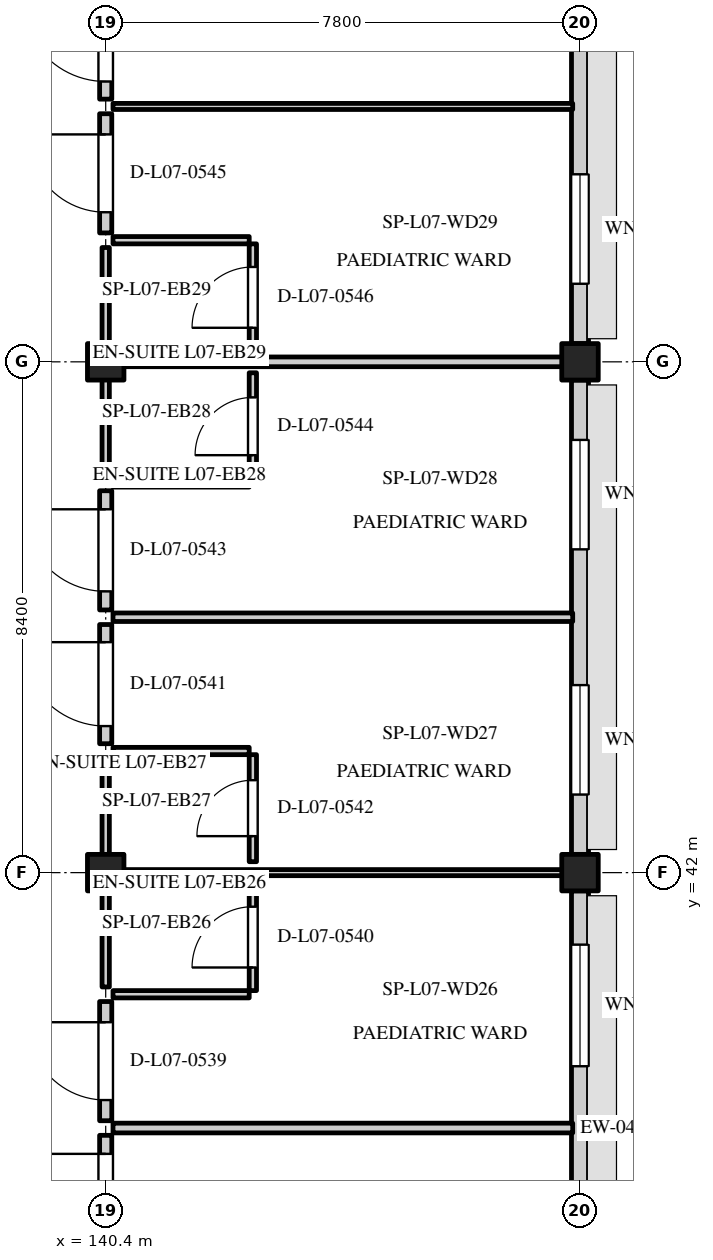
"""IFC4 building model, lengths in metres.
Left out: names, types, materials, properties, quantities, classifications, styles, units other than length and angle.
Written with IfcOpenShell. Run it as: python <this file> out.ifc"""

import sys

from ifc_helpers import new_model, si_unit, direction, frame, frame_2d, origin, origin_2d, place, context, subcontext, project, spatial, rectangle, extrude, element, fill, save


model = new_model("IFC4")
c1 = context("Model", 3, precision=1e-05, world=origin(), true_north=direction((0.0, 1.0)))
c2 = subcontext(c1, "Body", "Model", "MODEL_VIEW")
j1 = project(units=[si_unit("LENGTHUNIT", "METRE"), si_unit("PLANEANGLEUNIT", "RADIAN")], contexts=[c1])
p1 = place(None, origin())
s1 = spatial("IfcSite", under=j1, at=p1, CompositionType="ELEMENT")
p2 = place(p1, origin())
s2 = spatial("IfcBuilding", under=s1, at=p2, CompositionType="ELEMENT")
p3 = place(p2, frame((0.0, 0.0, 29.7)))
s3 = spatial("IfcBuildingStorey", under=s2, at=p3, CompositionType="ELEMENT", Elevation=29.7)
for number, where, z_axis, x_axis in (
    (1, (140.4, 42.0, 0.0), (0.0, 0.0, 1.0), (1.0, 0.0, 0.0)),
    (2, (140.4, 50.4, 0.0), (0.0, 0.0, 1.0), (1.0, 0.0, 0.0)),
    (3, (148.2, 42.0, 0.0), (0.0, 0.0, 1.0), (1.0, 0.0, 0.0)),
    (4, (148.2, 50.4, 0.0), (0.0, 0.0, 1.0), (1.0, 0.0, 0.0)),
):
    element("IfcColumn", number, at=place(p3, frame(where, z_axis=z_axis, x_axis=x_axis)), inside=s3, PredefinedType="COLUMN", context=c2, shape_type="SweptSolid", body=[
        extrude(rectangle(XDim=0.6, YDim=0.6, at=origin_2d()), origin(), (0.0, 0.0, 1.0), 4.2),
    ])
p4 = place(p3, frame((148.2, 33.9, 0.0), z_axis=(0.0, 0.0, 1.0), x_axis=(0.0, 1.0, 0.0)))
e5 = element("IfcWall", 5, at=p4, inside=s3, PredefinedType="STANDARD", context=c2, shape_type="SweptSolid", body=[
    extrude(rectangle(XDim=7.8, YDim=0.28, at=frame_2d((3.9, 0.0))), origin(), (0.0, 0.0, 1.0), 3.25),
])
p5 = place(p4, frame((0.884, 0.0, 0.8)))
e6 = element("IfcOpeningElement", 6, at=p5, cuts=e5, PredefinedType="OPENING", context=c2, shape_type="SweptSolid", body=[
    extrude(rectangle(XDim=2.0, YDim=1.45, at=frame_2d((1.0, 0.725))), frame((0.0, 0.152, 0.0), z_axis=(0.0, -1.0, 0.0), x_axis=(1.0, 0.0, 0.0)), (0.0, 0.0, 1.0), 0.304),
])
p6 = place(p4, frame((4.916, 0.0, 0.8)))
e7 = element("IfcOpeningElement", 7, at=p6, cuts=e5, PredefinedType="OPENING", context=c2, shape_type="SweptSolid", body=[
    extrude(rectangle(XDim=2.0, YDim=1.45, at=frame_2d((1.0, 0.725))), frame((0.0, 0.152, 0.0), z_axis=(0.0, -1.0, 0.0), x_axis=(1.0, 0.0, 0.0)), (0.0, 0.0, 1.0), 0.304),
])
p7 = place(p3, frame((148.2, 42.3, 0.0), z_axis=(0.0, 0.0, 1.0), x_axis=(0.0, 1.0, 0.0)))
e8 = element("IfcWall", 8, at=p7, inside=s3, PredefinedType="STANDARD", context=c2, shape_type="SweptSolid", body=[
    extrude(rectangle(XDim=7.8, YDim=0.28, at=frame_2d((3.9, 0.0))), origin(), (0.0, 0.0, 1.0), 3.25),
])
p8 = place(p7, frame((0.984, 0.0, 0.8)))
e9 = element("IfcOpeningElement", 9, at=p8, cuts=e8, PredefinedType="OPENING", context=c2, shape_type="SweptSolid", body=[
    extrude(rectangle(XDim=1.8, YDim=1.75, at=frame_2d((0.9, 0.875))), frame((0.0, 0.152, 0.0), z_axis=(0.0, -1.0, 0.0), x_axis=(1.0, 0.0, 0.0)), (0.0, 0.0, 1.0), 0.304),
])
p9 = place(p7, frame((5.016, 0.0, 0.8)))
e10 = element("IfcOpeningElement", 10, at=p9, cuts=e8, PredefinedType="OPENING", context=c2, shape_type="SweptSolid", body=[
    extrude(rectangle(XDim=1.8, YDim=1.75, at=frame_2d((0.9, 0.875))), frame((0.0, 0.152, 0.0), z_axis=(0.0, -1.0, 0.0), x_axis=(1.0, 0.0, 0.0)), (0.0, 0.0, 1.0), 0.304),
])
p10 = place(p3, frame((148.2, 50.7, 0.0), z_axis=(0.0, 0.0, 1.0), x_axis=(0.0, 1.0, 0.0)))
e11 = element("IfcWall", 11, at=p10, inside=s3, PredefinedType="STANDARD", context=c2, shape_type="SweptSolid", body=[
    extrude(rectangle(XDim=7.8, YDim=0.28, at=frame_2d((3.9, 0.0))), origin(), (0.0, 0.0, 1.0), 3.25),
])
p11 = place(p10, frame((0.984, 0.0, 0.8)))
e12 = element("IfcOpeningElement", 12, at=p11, cuts=e11, PredefinedType="OPENING", context=c2, shape_type="SweptSolid", body=[
    extrude(rectangle(XDim=1.8, YDim=1.65, at=frame_2d((0.9, 0.825))), frame((0.0, 0.152, 0.0), z_axis=(0.0, -1.0, 0.0), x_axis=(1.0, 0.0, 0.0)), (0.0, 0.0, 1.0), 0.304),
])
p12 = place(p10, frame((5.016, 0.0, 0.8)))
e13 = element("IfcOpeningElement", 13, at=p12, cuts=e11, PredefinedType="OPENING", context=c2, shape_type="SweptSolid", body=[
    extrude(rectangle(XDim=1.8, YDim=1.65, at=frame_2d((0.9, 0.825))), frame((0.0, 0.152, 0.0), z_axis=(0.0, -1.0, 0.0), x_axis=(1.0, 0.0, 0.0)), (0.0, 0.0, 1.0), 0.304),
])
p13 = place(p3, frame((140.52, 37.8, 0.0), z_axis=(0.0, 0.0, 1.0), x_axis=(1.0, 0.0, 0.0)))
e14 = element("IfcWall", 14, at=p13, inside=s3, PredefinedType="PARTITIONING", context=c2, shape_type="SweptSolid", body=[
    extrude(rectangle(XDim=7.56, YDim=0.16, at=frame_2d((3.78, 0.0))), origin(), (0.0, 0.0, 1.0), 3.88),
])
p14 = place(p3, frame((140.4, 35.72, 0.0), z_axis=(0.0, 0.0, 1.0), x_axis=(0.0, 1.0, 0.0)))
e15 = element("IfcWall", 15, at=p14, inside=s3, PredefinedType="STANDARD", context=c2, shape_type="SweptSolid", body=[
    extrude(rectangle(XDim=1.96, YDim=0.2, at=frame_2d((0.98, 0.0))), origin(), (0.0, 0.0, 1.0), 3.88),
])
p15 = place(p14, frame((0.305, 0.0, 0.0)))
e16 = element("IfcOpeningElement", 16, at=p15, cuts=e15, PredefinedType="OPENING", context=c2, shape_type="SweptSolid", body=[
    extrude(rectangle(XDim=1.35, YDim=2.15, at=frame_2d((0.675, 1.075))), frame((0.0, 0.112, 0.0), z_axis=(0.0, -1.0, 0.0), x_axis=(1.0, 0.0, 0.0)), (0.0, 0.0, 1.0), 0.224),
])
p16 = place(p3, frame((140.52, 42.0, 0.0), z_axis=(0.0, 0.0, 1.0), x_axis=(1.0, 0.0, 0.0)))
e17 = element("IfcWall", 17, at=p16, inside=s3, PredefinedType="PARTITIONING", context=c2, shape_type="SweptSolid", body=[
    extrude(rectangle(XDim=7.56, YDim=0.1, at=frame_2d((3.78, 0.0))), origin(), (0.0, 0.0, 1.0), 3.88),
])
p17 = place(p3, frame((140.4, 37.92, 0.0), z_axis=(0.0, 0.0, 1.0), x_axis=(0.0, 1.0, 0.0)))
e18 = element("IfcWall", 18, at=p17, inside=s3, PredefinedType="STANDARD", context=c2, shape_type="SweptSolid", body=[
    extrude(rectangle(XDim=1.96, YDim=0.2, at=frame_2d((0.98, 0.0))), origin(), (0.0, 0.0, 1.0), 3.88),
])
p18 = place(p17, frame((0.34, 0.0, 0.0)))
e19 = element("IfcOpeningElement", 19, at=p18, cuts=e18, PredefinedType="OPENING", context=c2, shape_type="SweptSolid", body=[
    extrude(rectangle(XDim=1.28, YDim=2.15, at=frame_2d((0.64, 1.075))), frame((0.0, 0.112, 0.0), z_axis=(0.0, -1.0, 0.0), x_axis=(1.0, 0.0, 0.0)), (0.0, 0.0, 1.0), 0.224),
])
p19 = place(p3, frame((140.4, 40.12, 0.0), z_axis=(0.0, 0.0, 1.0), x_axis=(0.0, 1.0, 0.0)))
e20 = element("IfcWall", 20, at=p19, inside=s3, PredefinedType="PARTITIONING", context=c2, shape_type="SweptSolid", body=[
    extrude(rectangle(XDim=1.76, YDim=0.12, at=frame_2d((0.88, 0.0))), origin(), (0.0, 0.0, 1.0), 3.88),
])
p20 = place(p3, frame((140.52, 40.0, 0.0), z_axis=(0.0, 0.0, 1.0), x_axis=(1.0, 0.0, 0.0)))
e21 = element("IfcWall", 21, at=p20, inside=s3, PredefinedType="PARTITIONING", context=c2, shape_type="SweptSolid", body=[
    extrude(rectangle(XDim=2.24, YDim=0.12, at=frame_2d((1.12, 0.0))), origin(), (0.0, 0.0, 1.0), 3.88),
])
p21 = place(p3, frame((142.82, 40.06, 0.0), z_axis=(0.0, 0.0, 1.0), x_axis=(0.0, 1.0, 0.0)))
e22 = element("IfcWall", 22, at=p21, inside=s3, PredefinedType="PARTITIONING", context=c2, shape_type="SweptSolid", body=[
    extrude(rectangle(XDim=1.76, YDim=0.12, at=frame_2d((0.88, 0.0))), origin(), (0.0, 0.0, 1.0), 3.88),
])
p22 = place(p21, frame((0.38, 0.0, 0.0)))
e23 = element("IfcOpeningElement", 23, at=p22, cuts=e22, PredefinedType="OPENING", context=c2, shape_type="SweptSolid", body=[
    extrude(rectangle(XDim=1.0, YDim=2.1, at=frame_2d((0.5, 1.05))), frame((0.0, 0.072, 0.0), z_axis=(0.0, -1.0, 0.0), x_axis=(1.0, 0.0, 0.0)), (0.0, 0.0, 1.0), 0.144),
])
p23 = place(p3, frame((140.52, 46.2, 0.0), z_axis=(0.0, 0.0, 1.0), x_axis=(1.0, 0.0, 0.0)))
e24 = element("IfcWall", 24, at=p23, inside=s3, PredefinedType="PARTITIONING", context=c2, shape_type="SweptSolid", body=[
    extrude(rectangle(XDim=7.56, YDim=0.14, at=frame_2d((3.78, 0.0))), origin(), (0.0, 0.0, 1.0), 3.88),
])
p24 = place(p3, frame((140.4, 44.12, 0.0), z_axis=(0.0, 0.0, 1.0), x_axis=(0.0, 1.0, 0.0)))
e25 = element("IfcWall", 25, at=p24, inside=s3, PredefinedType="STANDARD", context=c2, shape_type="SweptSolid", body=[
    extrude(rectangle(XDim=1.96, YDim=0.2, at=frame_2d((0.98, 0.0))), origin(), (0.0, 0.0, 1.0), 3.88),
])
p25 = place(p24, frame((0.29, 0.0, 0.0)))
e26 = element("IfcOpeningElement", 26, at=p25, cuts=e25, PredefinedType="OPENING", context=c2, shape_type="SweptSolid", body=[
    extrude(rectangle(XDim=1.38, YDim=2.2, at=frame_2d((0.69, 1.1))), frame((0.0, 0.112, 0.0), z_axis=(0.0, -1.0, 0.0), x_axis=(1.0, 0.0, 0.0)), (0.0, 0.0, 1.0), 0.224),
])
p26 = place(p3, frame((140.4, 42.12, 0.0), z_axis=(0.0, 0.0, 1.0), x_axis=(0.0, 1.0, 0.0)))
e27 = element("IfcWall", 27, at=p26, inside=s3, PredefinedType="PARTITIONING", context=c2, shape_type="SweptSolid", body=[
    extrude(rectangle(XDim=1.76, YDim=0.12, at=frame_2d((0.88, 0.0))), origin(), (0.0, 0.0, 1.0), 3.88),
])
p27 = place(p3, frame((140.52, 44.0, 0.0), z_axis=(0.0, 0.0, 1.0), x_axis=(1.0, 0.0, 0.0)))
e28 = element("IfcWall", 28, at=p27, inside=s3, PredefinedType="PARTITIONING", context=c2, shape_type="SweptSolid", body=[
    extrude(rectangle(XDim=2.24, YDim=0.12, at=frame_2d((1.12, 0.0))), origin(), (0.0, 0.0, 1.0), 3.88),
])
p28 = place(p3, frame((142.82, 42.18, 0.0), z_axis=(0.0, 0.0, 1.0), x_axis=(0.0, 1.0, 0.0)))
e29 = element("IfcWall", 29, at=p28, inside=s3, PredefinedType="PARTITIONING", context=c2, shape_type="SweptSolid", body=[
    extrude(rectangle(XDim=1.76, YDim=0.12, at=frame_2d((0.88, 0.0))), origin(), (0.0, 0.0, 1.0), 3.88),
])
p29 = place(p28, frame((0.42, 0.0, 0.0)))
e30 = element("IfcOpeningElement", 30, at=p29, cuts=e29, PredefinedType="OPENING", context=c2, shape_type="SweptSolid", body=[
    extrude(rectangle(XDim=0.92, YDim=2.08, at=frame_2d((0.46, 1.04))), frame((0.0, 0.072, 0.0), z_axis=(0.0, -1.0, 0.0), x_axis=(1.0, 0.0, 0.0)), (0.0, 0.0, 1.0), 0.144),
])
p30 = place(p3, frame((140.52, 50.4, 0.0), z_axis=(0.0, 0.0, 1.0), x_axis=(1.0, 0.0, 0.0)))
e31 = element("IfcWall", 31, at=p30, inside=s3, PredefinedType="PARTITIONING", context=c2, shape_type="SweptSolid", body=[
    extrude(rectangle(XDim=7.56, YDim=0.16, at=frame_2d((3.78, 0.0))), origin(), (0.0, 0.0, 1.0), 3.25),
])
p31 = place(p3, frame((140.4, 46.32, 0.0), z_axis=(0.0, 0.0, 1.0), x_axis=(0.0, 1.0, 0.0)))
e32 = element("IfcWall", 32, at=p31, inside=s3, PredefinedType="STANDARD", context=c2, shape_type="SweptSolid", body=[
    extrude(rectangle(XDim=1.96, YDim=0.2, at=frame_2d((0.98, 0.0))), origin(), (0.0, 0.0, 1.0), 3.88),
])
p32 = place(p31, frame((0.305, 0.0, 0.0)))
e33 = element("IfcOpeningElement", 33, at=p32, cuts=e32, PredefinedType="OPENING", context=c2, shape_type="SweptSolid", body=[
    extrude(rectangle(XDim=1.35, YDim=2.15, at=frame_2d((0.675, 1.075))), frame((0.0, 0.112, 0.0), z_axis=(0.0, -1.0, 0.0), x_axis=(1.0, 0.0, 0.0)), (0.0, 0.0, 1.0), 0.224),
])
p33 = place(p3, frame((140.4, 48.52, 0.0), z_axis=(0.0, 0.0, 1.0), x_axis=(0.0, 1.0, 0.0)))
e34 = element("IfcWall", 34, at=p33, inside=s3, PredefinedType="PARTITIONING", context=c2, shape_type="SweptSolid", body=[
    extrude(rectangle(XDim=1.76, YDim=0.12, at=frame_2d((0.88, 0.0))), origin(), (0.0, 0.0, 1.0), 3.88),
])
p34 = place(p3, frame((140.52, 48.4, 0.0), z_axis=(0.0, 0.0, 1.0), x_axis=(1.0, 0.0, 0.0)))
e35 = element("IfcWall", 35, at=p34, inside=s3, PredefinedType="PARTITIONING", context=c2, shape_type="SweptSolid", body=[
    extrude(rectangle(XDim=2.24, YDim=0.12, at=frame_2d((1.12, 0.0))), origin(), (0.0, 0.0, 1.0), 3.88),
])
p35 = place(p3, frame((142.82, 48.46, 0.0), z_axis=(0.0, 0.0, 1.0), x_axis=(0.0, 1.0, 0.0)))
e36 = element("IfcWall", 36, at=p35, inside=s3, PredefinedType="PARTITIONING", context=c2, shape_type="SweptSolid", body=[
    extrude(rectangle(XDim=1.76, YDim=0.12, at=frame_2d((0.88, 0.0))), origin(), (0.0, 0.0, 1.0), 3.88),
])
p36 = place(p35, frame((0.405, 0.0, 0.0)))
e37 = element("IfcOpeningElement", 37, at=p36, cuts=e36, PredefinedType="OPENING", context=c2, shape_type="SweptSolid", body=[
    extrude(rectangle(XDim=0.95, YDim=2.1, at=frame_2d((0.475, 1.05))), frame((0.0, 0.072, 0.0), z_axis=(0.0, -1.0, 0.0), x_axis=(1.0, 0.0, 0.0)), (0.0, 0.0, 1.0), 0.144),
])
p37 = place(p3, frame((140.52, 54.6, 0.0), z_axis=(0.0, 0.0, 1.0), x_axis=(1.0, 0.0, 0.0)))
e38 = element("IfcWall", 38, at=p37, inside=s3, PredefinedType="PARTITIONING", context=c2, shape_type="SweptSolid", body=[
    extrude(rectangle(XDim=7.56, YDim=0.1, at=frame_2d((3.78, 0.0))), origin(), (0.0, 0.0, 1.0), 3.88),
])
p38 = place(p3, frame((140.4, 52.52, 0.0), z_axis=(0.0, 0.0, 1.0), x_axis=(0.0, 1.0, 0.0)))
e39 = element("IfcWall", 39, at=p38, inside=s3, PredefinedType="STANDARD", context=c2, shape_type="SweptSolid", body=[
    extrude(rectangle(XDim=1.96, YDim=0.2, at=frame_2d((0.98, 0.0))), origin(), (0.0, 0.0, 1.0), 3.88),
])
p39 = place(p38, frame((0.34, 0.0, 0.0)))
e40 = element("IfcOpeningElement", 40, at=p39, cuts=e39, PredefinedType="OPENING", context=c2, shape_type="SweptSolid", body=[
    extrude(rectangle(XDim=1.28, YDim=2.15, at=frame_2d((0.64, 1.075))), frame((0.0, 0.112, 0.0), z_axis=(0.0, -1.0, 0.0), x_axis=(1.0, 0.0, 0.0)), (0.0, 0.0, 1.0), 0.224),
])
p40 = place(p3, frame((140.4, 50.52, 0.0), z_axis=(0.0, 0.0, 1.0), x_axis=(0.0, 1.0, 0.0)))
e41 = element("IfcWall", 41, at=p40, inside=s3, PredefinedType="PARTITIONING", context=c2, shape_type="SweptSolid", body=[
    extrude(rectangle(XDim=1.76, YDim=0.12, at=frame_2d((0.88, 0.0))), origin(), (0.0, 0.0, 1.0), 3.88),
])
p41 = place(p3, frame((140.52, 52.4, 0.0), z_axis=(0.0, 0.0, 1.0), x_axis=(1.0, 0.0, 0.0)))
e42 = element("IfcWall", 42, at=p41, inside=s3, PredefinedType="PARTITIONING", context=c2, shape_type="SweptSolid", body=[
    extrude(rectangle(XDim=2.24, YDim=0.12, at=frame_2d((1.12, 0.0))), origin(), (0.0, 0.0, 1.0), 3.88),
])
p42 = place(p3, frame((142.82, 50.58, 0.0), z_axis=(0.0, 0.0, 1.0), x_axis=(0.0, 1.0, 0.0)))
e43 = element("IfcWall", 43, at=p42, inside=s3, PredefinedType="PARTITIONING", context=c2, shape_type="SweptSolid", body=[
    extrude(rectangle(XDim=1.76, YDim=0.12, at=frame_2d((0.88, 0.0))), origin(), (0.0, 0.0, 1.0), 3.88),
])
p43 = place(p42, frame((0.38, 0.0, 0.0)))
e44 = element("IfcOpeningElement", 44, at=p43, cuts=e43, PredefinedType="OPENING", context=c2, shape_type="SweptSolid", body=[
    extrude(rectangle(XDim=1.0, YDim=2.1, at=frame_2d((0.5, 1.05))), frame((0.0, 0.072, 0.0), z_axis=(0.0, -1.0, 0.0), x_axis=(1.0, 0.0, 0.0)), (0.0, 0.0, 1.0), 0.144),
])
p44 = place(p3, frame((140.4, 54.72, 0.0), z_axis=(0.0, 0.0, 1.0), x_axis=(0.0, 1.0, 0.0)))
e45 = element("IfcWall", 45, at=p44, inside=s3, PredefinedType="STANDARD", context=c2, shape_type="SweptSolid", body=[
    extrude(rectangle(XDim=1.96, YDim=0.2, at=frame_2d((0.98, 0.0))), origin(), (0.0, 0.0, 1.0), 3.88),
])
p45 = place(p44, frame((0.29, 0.0, 0.0)))
e46 = element("IfcOpeningElement", 46, at=p45, cuts=e45, PredefinedType="OPENING", context=c2, shape_type="SweptSolid", body=[
    extrude(rectangle(XDim=1.38, YDim=2.2, at=frame_2d((0.69, 1.1))), frame((0.0, 0.112, 0.0), z_axis=(0.0, -1.0, 0.0), x_axis=(1.0, 0.0, 0.0)), (0.0, 0.0, 1.0), 0.224),
])
p46 = place(p6, origin())
e47 = element("IfcWindow", 47, at=p46, inside=s3, PartitioningType="DOUBLE_PANEL_VERTICAL", PredefinedType="WINDOW", context=c2, shape_type="SweptSolid", body=[
    extrude(rectangle(XDim=2.0, YDim=1.45, at=frame_2d((1.0, 0.725))), frame((0.0, 0.03, 0.0), z_axis=(0.0, -1.0, 0.0), x_axis=(1.0, 0.0, 0.0)), (0.0, 0.0, 1.0), 0.06),
])
fill(e7, e47)
p47 = place(p8, origin())
e48 = element("IfcWindow", 48, at=p47, inside=s3, PartitioningType="DOUBLE_PANEL_VERTICAL", PredefinedType="WINDOW", context=c2, shape_type="SweptSolid", body=[
    extrude(rectangle(XDim=1.8, YDim=1.75, at=frame_2d((0.9, 0.875))), frame((0.0, 0.03, 0.0), z_axis=(0.0, -1.0, 0.0), x_axis=(1.0, 0.0, 0.0)), (0.0, 0.0, 1.0), 0.06),
])
fill(e9, e48)
p48 = place(p9, origin())
e49 = element("IfcWindow", 49, at=p48, inside=s3, PartitioningType="DOUBLE_PANEL_VERTICAL", PredefinedType="WINDOW", context=c2, shape_type="SweptSolid", body=[
    extrude(rectangle(XDim=1.8, YDim=1.75, at=frame_2d((0.9, 0.875))), frame((0.0, 0.03, 0.0), z_axis=(0.0, -1.0, 0.0), x_axis=(1.0, 0.0, 0.0)), (0.0, 0.0, 1.0), 0.06),
])
fill(e10, e49)
p49 = place(p11, origin())
e50 = element("IfcWindow", 50, at=p49, inside=s3, PartitioningType="DOUBLE_PANEL_VERTICAL", PredefinedType="WINDOW", context=c2, shape_type="SweptSolid", body=[
    extrude(rectangle(XDim=1.8, YDim=1.65, at=frame_2d((0.9, 0.825))), frame((0.0, 0.03, 0.0), z_axis=(0.0, -1.0, 0.0), x_axis=(1.0, 0.0, 0.0)), (0.0, 0.0, 1.0), 0.06),
])
fill(e12, e50)
p50 = place(p15, frame((1.35, 0.0, 0.0), z_axis=(0.0, 0.0, 1.0), x_axis=(-1.0, 0.0, 0.0)))
e51 = element("IfcDoor", 51, at=p50, inside=s3, OperationType="SINGLE_SWING_LEFT", PredefinedType="DOOR", context=c2, shape_type="SweptSolid", body=[
    extrude(rectangle(XDim=1.35, YDim=2.15, at=frame_2d((0.675, 1.075))), frame((0.0, 0.025, 0.0), z_axis=(0.0, -1.0, 0.0), x_axis=(1.0, 0.0, 0.0)), (0.0, 0.0, 1.0), 0.05),
])
fill(e16, e51)
p51 = place(p18, frame((1.28, 0.0, 0.0), z_axis=(0.0, 0.0, 1.0), x_axis=(-1.0, 0.0, 0.0)))
e52 = element("IfcDoor", 52, at=p51, inside=s3, OperationType="SINGLE_SWING_LEFT", PredefinedType="DOOR", context=c2, shape_type="SweptSolid", body=[
    extrude(rectangle(XDim=1.28, YDim=2.15, at=frame_2d((0.64, 1.075))), frame((0.0, 0.025, 0.0), z_axis=(0.0, -1.0, 0.0), x_axis=(1.0, 0.0, 0.0)), (0.0, 0.0, 1.0), 0.05),
])
fill(e19, e52)
p52 = place(p22, origin())
e53 = element("IfcDoor", 53, at=p52, inside=s3, OperationType="SINGLE_SWING_LEFT", PredefinedType="DOOR", context=c2, shape_type="SweptSolid", body=[
    extrude(rectangle(XDim=1.0, YDim=2.1, at=frame_2d((0.5, 1.05))), frame((0.0, 0.025, 0.0), z_axis=(0.0, -1.0, 0.0), x_axis=(1.0, 0.0, 0.0)), (0.0, 0.0, 1.0), 0.05),
])
fill(e23, e53)
p53 = place(p25, frame((1.38, 0.0, 0.0), z_axis=(0.0, 0.0, 1.0), x_axis=(-1.0, 0.0, 0.0)))
e54 = element("IfcDoor", 54, at=p53, inside=s3, OperationType="SINGLE_SWING_LEFT", PredefinedType="DOOR", context=c2, shape_type="SweptSolid", body=[
    extrude(rectangle(XDim=1.38, YDim=2.2, at=frame_2d((0.69, 1.1))), frame((0.0, 0.025, 0.0), z_axis=(0.0, -1.0, 0.0), x_axis=(1.0, 0.0, 0.0)), (0.0, 0.0, 1.0), 0.05),
])
fill(e26, e54)
p54 = place(p29, origin())
e55 = element("IfcDoor", 55, at=p54, inside=s3, OperationType="SINGLE_SWING_LEFT", PredefinedType="DOOR", context=c2, shape_type="SweptSolid", body=[
    extrude(rectangle(XDim=0.92, YDim=2.08, at=frame_2d((0.46, 1.04))), frame((0.0, 0.025, 0.0), z_axis=(0.0, -1.0, 0.0), x_axis=(1.0, 0.0, 0.0)), (0.0, 0.0, 1.0), 0.05),
])
fill(e30, e55)
p55 = place(p32, frame((1.35, 0.0, 0.0), z_axis=(0.0, 0.0, 1.0), x_axis=(-1.0, 0.0, 0.0)))
e56 = element("IfcDoor", 56, at=p55, inside=s3, OperationType="SINGLE_SWING_LEFT", PredefinedType="DOOR", context=c2, shape_type="SweptSolid", body=[
    extrude(rectangle(XDim=1.35, YDim=2.15, at=frame_2d((0.675, 1.075))), frame((0.0, 0.025, 0.0), z_axis=(0.0, -1.0, 0.0), x_axis=(1.0, 0.0, 0.0)), (0.0, 0.0, 1.0), 0.05),
])
fill(e33, e56)
p56 = place(p36, origin())
e57 = element("IfcDoor", 57, at=p56, inside=s3, OperationType="SINGLE_SWING_LEFT", PredefinedType="DOOR", context=c2, shape_type="SweptSolid", body=[
    extrude(rectangle(XDim=0.95, YDim=2.1, at=frame_2d((0.475, 1.05))), frame((0.0, 0.025, 0.0), z_axis=(0.0, -1.0, 0.0), x_axis=(1.0, 0.0, 0.0)), (0.0, 0.0, 1.0), 0.05),
])
fill(e37, e57)
p57 = place(p39, frame((1.28, 0.0, 0.0), z_axis=(0.0, 0.0, 1.0), x_axis=(-1.0, 0.0, 0.0)))
e58 = element("IfcDoor", 58, at=p57, inside=s3, OperationType="SINGLE_SWING_LEFT", PredefinedType="DOOR", context=c2, shape_type="SweptSolid", body=[
    extrude(rectangle(XDim=1.28, YDim=2.15, at=frame_2d((0.64, 1.075))), frame((0.0, 0.025, 0.0), z_axis=(0.0, -1.0, 0.0), x_axis=(1.0, 0.0, 0.0)), (0.0, 0.0, 1.0), 0.05),
])
fill(e40, e58)
p58 = place(p43, origin())
e59 = element("IfcDoor", 59, at=p58, inside=s3, OperationType="SINGLE_SWING_LEFT", PredefinedType="DOOR", context=c2, shape_type="SweptSolid", body=[
    extrude(rectangle(XDim=1.0, YDim=2.1, at=frame_2d((0.5, 1.05))), frame((0.0, 0.025, 0.0), z_axis=(0.0, -1.0, 0.0), x_axis=(1.0, 0.0, 0.0)), (0.0, 0.0, 1.0), 0.05),
])
fill(e44, e59)
p59 = place(p45, frame((1.38, 0.0, 0.0), z_axis=(0.0, 0.0, 1.0), x_axis=(-1.0, 0.0, 0.0)))
e60 = element("IfcDoor", 60, at=p59, inside=s3, OperationType="SINGLE_SWING_LEFT", PredefinedType="DOOR", context=c2, shape_type="SweptSolid", body=[
    extrude(rectangle(XDim=1.38, YDim=2.2, at=frame_2d((0.69, 1.1))), frame((0.0, 0.025, 0.0), z_axis=(0.0, -1.0, 0.0), x_axis=(1.0, 0.0, 0.0)), (0.0, 0.0, 1.0), 0.05),
])
fill(e46, e60)
save(model, sys.argv[1])
